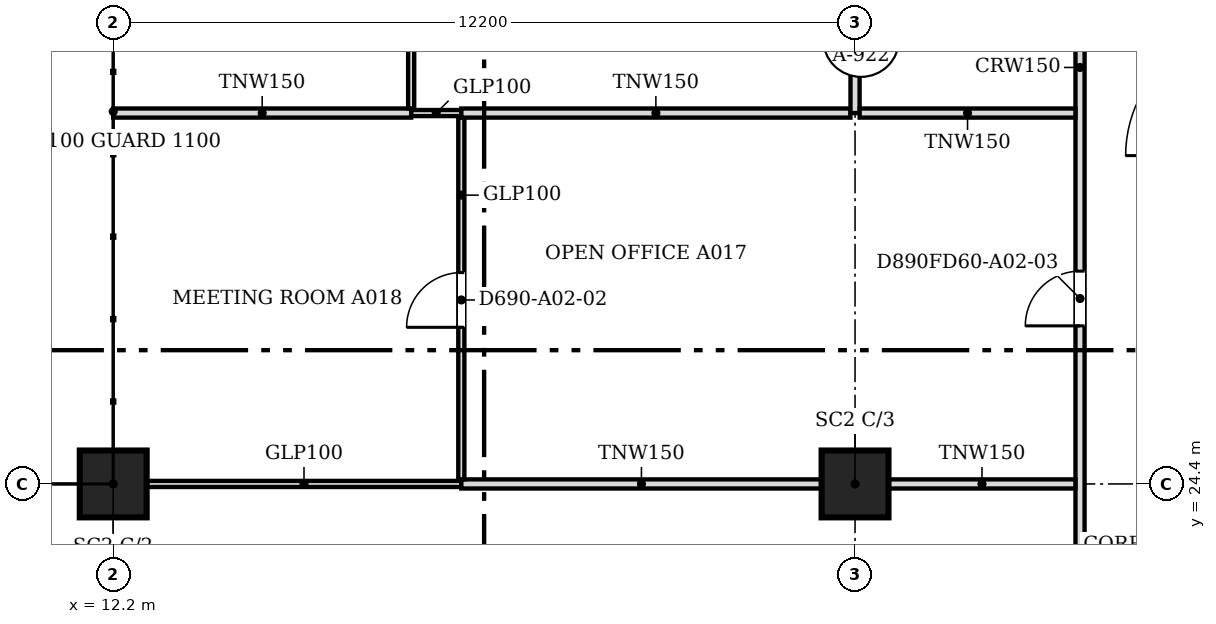
"""IFC4 building model, lengths in metres.
Left out: names, types, materials, properties, quantities, classifications, styles, units other than length and angle.
Written with IfcOpenShell. Run it as: python <this file> out.ifc"""

import sys

from ifc_helpers import new_model, si_unit, direction, frame, frame_2d, origin, origin_2d, place, context, subcontext, project, spatial, rectangle, extrude, source, transform, mapped, element, fill, save


model = new_model("IFC4")
c1 = context("Model", 3, precision=1e-05, world=origin(), true_north=direction((0.0, 1.0)))
c2 = subcontext(c1, "Body", "Model", "MODEL_VIEW")
j1 = project(units=[si_unit("LENGTHUNIT", "METRE"), si_unit("PLANEANGLEUNIT", "RADIAN")], contexts=[c1])
p1 = place(None, origin())
s1 = spatial("IfcSite", under=j1, at=p1, CompositionType="ELEMENT")
p2 = place(p1, origin())
s2 = spatial("IfcBuilding", under=s1, at=p2, CompositionType="ELEMENT")
p3 = place(p2, frame((0.0, 0.0, 25.8)))
s3 = spatial("IfcBuildingStorey", under=s2, at=p3, CompositionType="ELEMENT", Elevation=25.8)
for number, where, z_axis, x_axis in (
    (1, (12.2, 24.4, 0.0), (0.0, 0.0, 1.0), (1.0, 0.0, 0.0)),
    (2, (24.4, 24.4, 0.0), (0.0, 0.0, 1.0), (1.0, 0.0, 0.0)),
):
    element("IfcColumn", number, at=place(p3, frame(where, z_axis=z_axis, x_axis=x_axis)), inside=s3, PredefinedType="COLUMN", context=c2, shape_type="SweptSolid", body=[
        extrude(rectangle(XDim=1.1, YDim=1.1, at=origin_2d()), origin(), (0.0, 0.0, 1.0), 3.6),
    ])
p4 = place(p3, frame((28.1, 18.8, 0.0), z_axis=(0.0, 0.0, 1.0), x_axis=(0.0, 1.0, 0.0)))
e3 = element("IfcWall", 3, at=p4, inside=s3, PredefinedType="PARTITIONING", context=c2, shape_type="SweptSolid", body=[
    extrude(rectangle(XDim=26.5, YDim=0.15, at=frame_2d((13.25, 0.0))), origin(), (0.0, 0.0, 1.0), 3.067),
])
m1 = source(origin(), c2, "Body", "SweptSolid", [
    extrude(rectangle(XDim=0.9, YDim=2.1, at=frame_2d((0.45, 1.05))), frame((0.0, 0.085, 0.0), z_axis=(0.0, -1.0, 0.0), x_axis=(1.0, 0.0, 0.0)), (0.0, 0.0, 1.0), 0.17),
])
p5 = place(p4, frame((1.1, 0.0, 0.0)))
e4 = element("IfcOpeningElement", 4, at=p5, cuts=e3, PredefinedType="OPENING", context=c2, shape_type="MappedRepresentation", body=[
    mapped(m1, transform((0.0, 0.0, 0.0), scale=1.0)),
])
m2 = source(origin(), c2, "Body", "SweptSolid", [
    extrude(rectangle(XDim=1.0, YDim=2.1, at=frame_2d((0.5, 1.05))), frame((0.0, 0.085, 0.0), z_axis=(0.0, -1.0, 0.0), x_axis=(1.0, 0.0, 0.0)), (0.0, 0.0, 1.0), 0.17),
])
p6 = place(p4, frame((23.151, 0.0, 0.0)))
e5 = element("IfcOpeningElement", 5, at=p6, cuts=e3, PredefinedType="OPENING", context=c2, shape_type="MappedRepresentation", body=[
    mapped(m2, transform((0.0, 0.0, 0.0), scale=1.0)),
])
p7 = place(p4, frame((8.2, 0.0, 0.0)))
e6 = element("IfcOpeningElement", 6, at=p7, cuts=e3, PredefinedType="OPENING", context=c2, shape_type="MappedRepresentation", body=[
    mapped(m1, transform((0.0, 0.0, 0.0), scale=1.0)),
])
p8 = place(p4, frame((15.8, 0.0, 0.0)))
e7 = element("IfcOpeningElement", 7, at=p8, cuts=e3, PredefinedType="OPENING", context=c2, shape_type="MappedRepresentation", body=[
    mapped(m2, transform((0.0, 0.0, 0.0), scale=1.0)),
])
p9 = place(p3, frame((12.751, 24.4, 0.0), z_axis=(0.0, 0.0, 1.0), x_axis=(1.0, 0.0, 0.0)))
e8 = element("IfcWall", 8, at=p9, inside=s3, PredefinedType="PARTITIONING", context=c2, shape_type="SweptSolid", body=[
    extrude(rectangle(XDim=5.173, YDim=0.1, at=frame_2d((2.586, 0.0))), origin(), (0.0, 0.0, 1.0), 3.067),
])
p10 = place(p3, frame((17.925, 24.4, 0.0), z_axis=(0.0, 0.0, 1.0), x_axis=(1.0, 0.0, 0.0)))
e9 = element("IfcWall", 9, at=p10, inside=s3, PredefinedType="PARTITIONING", context=c2, shape_type="SweptSolid", body=[
    extrude(rectangle(XDim=5.924, YDim=0.15, at=frame_2d((2.962, 0.0))), origin(), (0.0, 0.0, 1.0), 3.067),
])
p11 = place(p3, frame((24.951, 24.4, 0.0), z_axis=(0.0, 0.0, 1.0), x_axis=(1.0, 0.0, 0.0)))
e10 = element("IfcWall", 10, at=p11, inside=s3, PredefinedType="PARTITIONING", context=c2, shape_type="SweptSolid", body=[
    extrude(rectangle(XDim=3.073, YDim=0.15, at=frame_2d((1.537, 0.0))), origin(), (0.0, 0.0, 1.0), 3.067),
])
p12 = place(p3, frame((17.925, 24.476, 0.0), z_axis=(0.0, 0.0, 1.0), x_axis=(0.0, 1.0, 0.0)))
e11 = element("IfcWall", 11, at=p12, inside=s3, PredefinedType="PARTITIONING", context=c2, shape_type="SweptSolid", body=[
    extrude(rectangle(XDim=5.948, YDim=0.1, at=frame_2d((2.974, 0.0))), origin(), (0.0, 0.0, 1.0), 3.067),
])
m3 = source(origin(), c2, "Body", "SweptSolid", [
    extrude(rectangle(XDim=0.9, YDim=2.1, at=frame_2d((0.45, 1.05))), frame((0.0, 0.06, 0.0), z_axis=(0.0, -1.0, 0.0), x_axis=(1.0, 0.0, 0.0)), (0.0, 0.0, 1.0), 0.12),
])
p13 = place(p12, frame((2.5, 0.0, 0.0)))
e12 = element("IfcOpeningElement", 12, at=p13, cuts=e11, PredefinedType="OPENING", context=c2, shape_type="MappedRepresentation", body=[
    mapped(m3, transform((0.0, 0.0, 0.0), scale=1.0)),
])
p14 = place(p3, frame((12.2, 30.5, 0.0), z_axis=(0.0, 0.0, 1.0), x_axis=(1.0, 0.0, 0.0)))
e13 = element("IfcWall", 13, at=p14, inside=s3, PredefinedType="PARTITIONING", context=c2, shape_type="SweptSolid", body=[
    extrude(rectangle(XDim=4.9, YDim=0.15, at=frame_2d((2.45, 0.0))), origin(), (0.0, 0.0, 1.0), 3.067),
])
p15 = place(p3, frame((17.101, 30.5, 0.0), z_axis=(0.0, 0.0, 1.0), x_axis=(1.0, 0.0, 0.0)))
e14 = element("IfcWall", 14, at=p15, inside=s3, PredefinedType="PARTITIONING", context=c2, shape_type="SweptSolid", body=[
    extrude(rectangle(XDim=0.823, YDim=0.1, at=frame_2d((0.412, 0.0))), origin(), (0.0, 0.0, 1.0), 3.067),
])
p16 = place(p3, frame((17.925, 30.5, 0.0), z_axis=(0.0, 0.0, 1.0), x_axis=(1.0, 0.0, 0.0)))
e15 = element("IfcWall", 15, at=p16, inside=s3, PredefinedType="PARTITIONING", context=c2, shape_type="SweptSolid", body=[
    extrude(rectangle(XDim=6.399, YDim=0.15, at=frame_2d((3.199, 0.0))), origin(), (0.0, 0.0, 1.0), 3.067),
])
p17 = place(p3, frame((24.4, 30.5, 0.0), z_axis=(0.0, 0.0, 1.0), x_axis=(0.0, 1.0, 0.0)))
e16 = element("IfcWall", 16, at=p17, inside=s3, PredefinedType="PARTITIONING", context=c2, shape_type="SweptSolid", body=[
    extrude(rectangle(XDim=5.549, YDim=0.15, at=frame_2d((2.774, 0.0))), origin(), (0.0, 0.0, 1.0), 3.067),
])
p18 = place(p3, frame((24.476, 30.5, 0.0), z_axis=(0.0, 0.0, 1.0), x_axis=(1.0, 0.0, 0.0)))
e17 = element("IfcWall", 17, at=p18, inside=s3, PredefinedType="PARTITIONING", context=c2, shape_type="SweptSolid", body=[
    extrude(rectangle(XDim=3.548, YDim=0.15, at=frame_2d((1.774, 0.0))), origin(), (0.0, 0.0, 1.0), 3.067),
])
p19 = place(p3, frame((17.1, 30.576, 0.0), z_axis=(0.0, 0.0, 1.0), x_axis=(0.0, 1.0, 0.0)))
e18 = element("IfcWall", 18, at=p19, inside=s3, PredefinedType="PARTITIONING", context=c2, shape_type="SweptSolid", body=[
    extrude(rectangle(XDim=4.768, YDim=0.1, at=frame_2d((2.384, 0.0))), origin(), (0.0, 0.0, 1.0), 3.067),
])
p20 = place(p19, frame((1.9, 0.0, 0.0)))
e19 = element("IfcOpeningElement", 19, at=p20, cuts=e18, PredefinedType="OPENING", context=c2, shape_type="MappedRepresentation", body=[
    mapped(m3, transform((0.0, 0.0, 0.0), scale=1.0)),
])
m4 = source(origin(), c2, "Body", "SweptSolid", [
    extrude(rectangle(XDim=0.9, YDim=2.1, at=frame_2d((0.45, 1.05))), frame((0.0, 0.025, 0.0), z_axis=(0.0, -1.0, 0.0), x_axis=(1.0, 0.0, 0.0)), (0.0, 0.0, 1.0), 0.05),
])
p21 = place(p13, origin())
e20 = element("IfcDoor", 20, at=p21, inside=s3, OperationType="SINGLE_SWING_LEFT", PredefinedType="DOOR", context=c2, shape_type="MappedRepresentation", body=[
    mapped(m4, transform((0.0, 0.0, 0.0), scale=1.0)),
])
fill(e12, e20)
p22 = place(p7, origin())
e21 = element("IfcDoor", 21, at=p22, inside=s3, OperationType="SINGLE_SWING_LEFT", PredefinedType="DOOR", context=c2, shape_type="MappedRepresentation", body=[
    mapped(m4, transform((0.0, 0.0, 0.0), scale=1.0)),
])
fill(e6, e21)
save(model, sys.argv[1])
